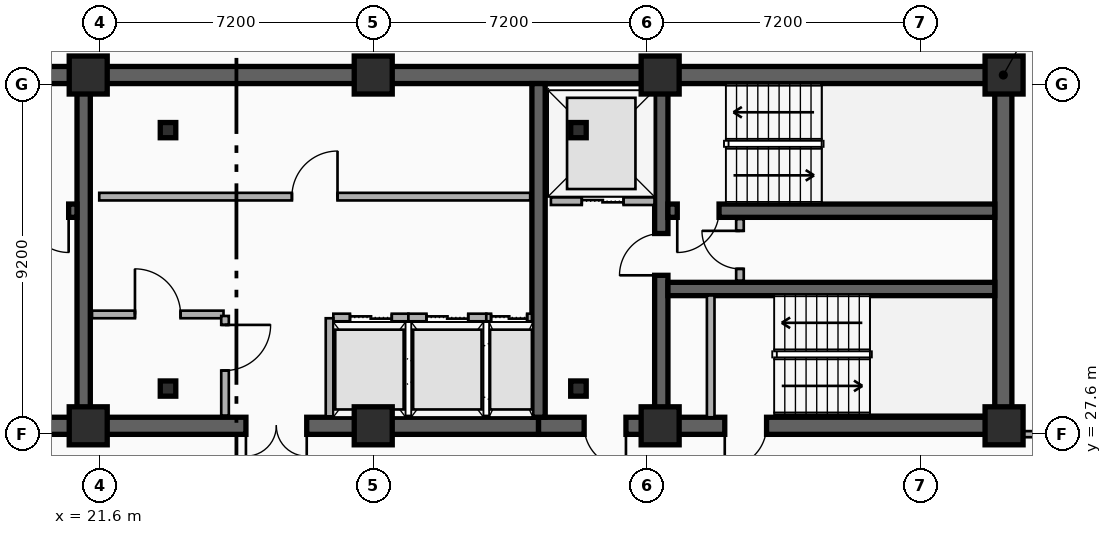
"""IFC4 building model, lengths in metres.
Left out: names, types, materials, properties, quantities, classifications, styles, units other than length and angle.
Written with IfcOpenShell. Run it as: python <this file> out.ifc"""

import sys

from ifc_helpers import new_model, si_unit, direction, frame, frame_2d, origin, origin_2d, place, context, subcontext, project, spatial, rectangle, i_section, extrude, element, fill, save


model = new_model("IFC4")
c1 = context("Model", 3, precision=1e-05, world=origin(), true_north=direction((0.0, 1.0)))
c2 = subcontext(c1, "Body", "Model", "MODEL_VIEW")
j1 = project(units=[si_unit("LENGTHUNIT", "METRE"), si_unit("PLANEANGLEUNIT", "RADIAN")], contexts=[c1])
p1 = place(None, origin())
s1 = spatial("IfcSite", under=j1, at=p1, CompositionType="ELEMENT")
p2 = place(p1, origin())
s2 = spatial("IfcBuilding", under=s1, at=p2, CompositionType="ELEMENT")
p3 = place(p2, frame((0.0, 0.0, 214.8)))
s3 = spatial("IfcBuildingStorey", under=s2, at=p3, CompositionType="ELEMENT", Elevation=214.8)
p4 = place(p3, frame((12.15, 37.05, 0.0), z_axis=(0.0, 0.0, 1.0), x_axis=(1.0, 0.0, 0.0)))
e1 = element("IfcWall", 1, at=p4, inside=s3, PredefinedType="SHEAR", context=c2, shape_type="SweptSolid", body=[
    extrude(rectangle(XDim=33.23, YDim=0.45, at=frame_2d((16.615, 0.0))), origin(), (0.0, 0.0, 1.0), 3.6),
])
p5 = place(p3, frame((21.18, 27.82, 0.0), z_axis=(0.0, 0.0, 1.0), x_axis=(-1.0, 0.0, 0.0)))
e2 = element("IfcWall", 2, at=p5, inside=s3, PredefinedType="SHEAR", context=c2, shape_type="SweptSolid", body=[
    extrude(rectangle(XDim=9.03, YDim=0.45, at=frame_2d((4.515, 0.0))), origin(), (0.0, 0.0, 1.0), 3.6),
])
p6 = place(p5, frame((2.68, 0.0, 0.0)))
e3 = element("IfcOpeningElement", 3, at=p6, cuts=e2, PredefinedType="OPENING", context=c2, shape_type="SweptSolid", body=[
    extrude(rectangle(XDim=1.1, YDim=2.15, at=frame_2d((0.55, 1.075))), frame((0.0, 0.235, 0.0), z_axis=(0.0, -1.0, 0.0), x_axis=(1.0, 0.0, 0.0)), (0.0, 0.0, 1.0), 0.47),
])
p7 = place(p3, frame((33.15, 27.82, 0.0), z_axis=(0.0, 0.0, 1.0), x_axis=(-1.0, 0.0, 0.0)))
e4 = element("IfcWall", 4, at=p7, inside=s3, PredefinedType="SHEAR", context=c2, shape_type="SweptSolid", body=[
    extrude(rectangle(XDim=11.97, YDim=0.45, at=frame_2d((5.985, 0.0))), origin(), (0.0, 0.0, 1.0), 3.6),
])
p8 = place(p7, frame((6.1, 0.0, 0.0)))
e5 = element("IfcOpeningElement", 5, at=p8, cuts=e4, PredefinedType="OPENING", context=c2, shape_type="SweptSolid", body=[
    extrude(rectangle(XDim=1.6, YDim=2.2, at=frame_2d((0.8, 1.1))), frame((0.0, 0.235, 0.0), z_axis=(0.0, -1.0, 0.0), x_axis=(1.0, 0.0, 0.0)), (0.0, 0.0, 1.0), 0.47),
])
p9 = place(p3, frame((45.38, 27.82, 0.0), z_axis=(0.0, 0.0, 1.0), x_axis=(-1.0, 0.0, 0.0)))
e6 = element("IfcWall", 6, at=p9, inside=s3, PredefinedType="SHEAR", context=c2, shape_type="SweptSolid", body=[
    extrude(rectangle(XDim=12.23, YDim=0.45, at=frame_2d((6.115, 0.0))), origin(), (0.0, 0.0, 1.0), 3.6),
])
p10 = place(p9, frame((9.93, 0.0, 0.0)))
e7 = element("IfcOpeningElement", 7, at=p10, cuts=e6, PredefinedType="OPENING", context=c2, shape_type="SweptSolid", body=[
    extrude(rectangle(XDim=1.1, YDim=2.15, at=frame_2d((0.55, 1.075))), frame((0.0, 0.235, 0.0), z_axis=(0.0, -1.0, 0.0), x_axis=(1.0, 0.0, 0.0)), (0.0, 0.0, 1.0), 0.47),
])
p11 = place(p9, frame((6.23, 0.0, 0.0)))
e8 = element("IfcOpeningElement", 8, at=p11, cuts=e6, PredefinedType="OPENING", context=c2, shape_type="SweptSolid", body=[
    extrude(rectangle(XDim=1.1, YDim=2.15, at=frame_2d((0.55, 1.075))), frame((0.0, 0.235, 0.0), z_axis=(0.0, -1.0, 0.0), x_axis=(1.0, 0.0, 0.0)), (0.0, 0.0, 1.0), 0.47),
])
p12 = place(p3, frame((45.38, 28.045, 0.0), z_axis=(0.0, 0.0, 1.0), x_axis=(0.0, 1.0, 0.0)))
e9 = element("IfcWall", 9, at=p12, inside=s3, PredefinedType="SHEAR", context=c2, shape_type="SweptSolid", body=[
    extrude(rectangle(XDim=8.78, YDim=0.45, at=frame_2d((4.39, 0.0))), origin(), (0.0, 0.0, 1.0), 3.6),
])
for number, where, z_axis, x_axis in (
    (10, (21.18, 28.045, 0.0), (0.0, 0.0, 1.0), (0.0, 1.0, 0.0)),
    (11, (33.15, 28.045, 0.0), (0.0, 0.0, 1.0), (0.0, 1.0, 0.0)),
):
    element("IfcWall", number, at=place(p3, frame(where, z_axis=z_axis, x_axis=x_axis)), inside=s3, PredefinedType="SHEAR", context=c2, shape_type="SweptSolid", body=[
        extrude(rectangle(XDim=8.78, YDim=0.35, at=frame_2d((4.39, 0.0))), origin(), (0.0, 0.0, 1.0), 3.6),
    ])
p13 = place(p3, frame((36.38, 28.045, 0.0), z_axis=(0.0, 0.0, 1.0), x_axis=(0.0, 1.0, 0.0)))
e12 = element("IfcWall", 12, at=p13, inside=s3, PredefinedType="SHEAR", context=c2, shape_type="SweptSolid", body=[
    extrude(rectangle(XDim=8.78, YDim=0.35, at=frame_2d((4.39, 0.0))), origin(), (0.0, 0.0, 1.0), 3.6),
])
p14 = place(p13, frame((3.735, 0.0, 0.0)))
e13 = element("IfcOpeningElement", 13, at=p14, cuts=e12, PredefinedType="OPENING", context=c2, shape_type="SweptSolid", body=[
    extrude(rectangle(XDim=1.1, YDim=2.15, at=frame_2d((0.55, 1.075))), frame((0.0, 0.185, 0.0), z_axis=(0.0, -1.0, 0.0), x_axis=(1.0, 0.0, 0.0)), (0.0, 0.0, 1.0), 0.37),
])
p15 = place(p3, frame((21.005, 33.48, 0.0), z_axis=(0.0, 0.0, 1.0), x_axis=(-1.0, 0.0, 0.0)))
e14 = element("IfcWall", 14, at=p15, inside=s3, PredefinedType="SHEAR", context=c2, shape_type="SweptSolid", body=[
    extrude(rectangle(XDim=8.63, YDim=0.35, at=frame_2d((4.315, 0.0))), origin(), (0.0, 0.0, 1.0), 3.6),
])
p16 = place(p15, frame((0.22, 0.0, 0.0)))
e15 = element("IfcOpeningElement", 15, at=p16, cuts=e14, PredefinedType="OPENING", context=c2, shape_type="SweptSolid", body=[
    extrude(rectangle(XDim=1.1, YDim=2.15, at=frame_2d((0.55, 1.075))), frame((0.0, 0.185, 0.0), z_axis=(0.0, -1.0, 0.0), x_axis=(1.0, 0.0, 0.0)), (0.0, 0.0, 1.0), 0.37),
])
p17 = place(p3, frame((45.155, 33.48, 0.0), z_axis=(0.0, 0.0, 1.0), x_axis=(-1.0, 0.0, 0.0)))
e16 = element("IfcWall", 16, at=p17, inside=s3, PredefinedType="SHEAR", context=c2, shape_type="SweptSolid", body=[
    extrude(rectangle(XDim=8.6, YDim=0.35, at=frame_2d((4.3, 0.0))), origin(), (0.0, 0.0, 1.0), 3.6),
])
p18 = place(p17, frame((7.255, 0.0, 0.0)))
e17 = element("IfcOpeningElement", 17, at=p18, cuts=e16, PredefinedType="OPENING", context=c2, shape_type="SweptSolid", body=[
    extrude(rectangle(XDim=1.1, YDim=2.15, at=frame_2d((0.55, 1.075))), frame((0.0, 0.185, 0.0), z_axis=(0.0, -1.0, 0.0), x_axis=(1.0, 0.0, 0.0)), (0.0, 0.0, 1.0), 0.37),
])
p19 = place(p3, frame((36.555, 31.42, 0.0), z_axis=(0.0, 0.0, 1.0), x_axis=(1.0, 0.0, 0.0)))
e18 = element("IfcWall", 18, at=p19, inside=s3, PredefinedType="SHEAR", context=c2, shape_type="SweptSolid", body=[
    extrude(rectangle(XDim=8.6, YDim=0.35, at=frame_2d((4.3, 0.0))), origin(), (0.0, 0.0, 1.0), 3.6),
])
for number, where, z_axis, x_axis in (
    (19, (23.4, 28.8, 0.0), (0.0, 0.0, 1.0), (1.0, 0.0, 0.0)),
    (20, (34.2, 28.8, 0.0), (0.0, 0.0, 1.0), (1.0, 0.0, 0.0)),
    (21, (34.2, 35.6, 0.0), (0.0, 0.0, 1.0), (1.0, 0.0, 0.0)),
    (22, (23.4, 35.6, 0.0), (0.0, 0.0, 1.0), (1.0, 0.0, 0.0)),
):
    element("IfcColumn", number, at=place(p3, frame(where, z_axis=z_axis, x_axis=x_axis)), inside=s3, PredefinedType="COLUMN", context=c2, shape_type="SweptSolid", body=[
        extrude(i_section(OverallWidth=0.408, OverallDepth=0.4, WebThickness=0.025, FlangeThickness=0.039, FilletRadius=0.015, at=origin_2d()), origin(), (0.0, 0.0, 1.0), 3.6),
    ])
for number, where, z_axis, x_axis in (
    (23, (21.3, 27.82, 0.0), (0.0, 0.0, 1.0), (1.0, 0.0, 0.0)),
    (24, (21.3, 37.05, 0.0), (0.0, 0.0, 1.0), (1.0, 0.0, 0.0)),
    (25, (28.8, 27.82, 0.0), (0.0, 0.0, 1.0), (1.0, 0.0, 0.0)),
    (26, (28.8, 37.05, 0.0), (0.0, 0.0, 1.0), (1.0, 0.0, 0.0)),
    (27, (36.35, 27.82, 0.0), (0.0, 0.0, 1.0), (1.0, 0.0, 0.0)),
    (28, (36.35, 37.05, 0.0), (0.0, 0.0, 1.0), (1.0, 0.0, 0.0)),
    (29, (45.4, 27.82, 0.0), (0.0, 0.0, 1.0), (1.0, 0.0, 0.0)),
    (30, (45.4, 37.05, 0.0), (0.0, 0.0, 1.0), (1.0, 0.0, 0.0)),
):
    element("IfcColumn", number, at=place(p3, frame(where, z_axis=z_axis, x_axis=x_axis)), inside=s3, PredefinedType="COLUMN", context=c2, shape_type="SweptSolid", body=[
        extrude(rectangle(XDim=1.0, YDim=1.0, at=origin_2d()), origin(), (0.0, 0.0, 1.0), 3.6),
    ])
p20 = place(p3, frame((33.475, 33.73, 0.0), z_axis=(0.0, 0.0, 1.0), x_axis=(1.0, 0.0, 0.0)))
e31 = element("IfcWall", 31, at=p20, inside=s3, PredefinedType="PARTITIONING", context=c2, shape_type="SweptSolid", body=[
    extrude(rectangle(XDim=2.725, YDim=0.2, at=frame_2d((1.362, 0.0))), origin(), (0.0, 0.0, 1.0), 2.41),
])
p21 = place(p20, frame((0.812, 0.0, 0.0)))
e32 = element("IfcOpeningElement", 32, at=p21, cuts=e31, PredefinedType="OPENING", context=c2, shape_type="SweptSolid", body=[
    extrude(rectangle(XDim=1.1, YDim=2.15, at=frame_2d((0.55, 1.075))), frame((0.0, 0.11, 0.0), z_axis=(0.0, -1.0, 0.0), x_axis=(1.0, 0.0, 0.0)), (0.0, 0.0, 1.0), 0.22),
])
p22 = place(p3, frame((27.75, 30.67, 0.0), z_axis=(0.0, 0.0, 1.0), x_axis=(1.0, 0.0, 0.0)))
e33 = element("IfcWall", 33, at=p22, inside=s3, PredefinedType="PARTITIONING", context=c2, shape_type="SweptSolid", body=[
    extrude(rectangle(XDim=1.975, YDim=0.2, at=frame_2d((0.988, 0.0))), origin(), (0.0, 0.0, 1.0), 2.41),
])
p23 = place(p22, frame((0.438, 0.0, 0.0)))
e34 = element("IfcOpeningElement", 34, at=p23, cuts=e33, PredefinedType="OPENING", context=c2, shape_type="SweptSolid", body=[
    extrude(rectangle(XDim=1.1, YDim=2.15, at=frame_2d((0.55, 1.075))), frame((0.0, 0.11, 0.0), z_axis=(0.0, -1.0, 0.0), x_axis=(1.0, 0.0, 0.0)), (0.0, 0.0, 1.0), 0.22),
])
p24 = place(p3, frame((27.65, 28.07, 0.0), z_axis=(0.0, 0.0, 1.0), x_axis=(0.0, 1.0, 0.0)))
e35 = element("IfcWall", 35, at=p24, inside=s3, PredefinedType="PARTITIONING", context=c2, shape_type="SweptSolid", body=[
    extrude(rectangle(XDim=2.58, YDim=0.2, at=frame_2d((1.29, 0.0))), origin(), (0.0, 0.0, 1.0), 2.41),
])
p25 = place(p3, frame((29.725, 30.67, 0.0), z_axis=(0.0, 0.0, 1.0), x_axis=(1.0, 0.0, 0.0)))
e36 = element("IfcWall", 36, at=p25, inside=s3, PredefinedType="PARTITIONING", context=c2, shape_type="SweptSolid", body=[
    extrude(rectangle(XDim=2.05, YDim=0.2, at=frame_2d((1.025, 0.0))), origin(), (0.0, 0.0, 1.0), 2.72),
])
p26 = place(p25, frame((0.475, 0.0, 0.0)))
e37 = element("IfcOpeningElement", 37, at=p26, cuts=e36, PredefinedType="OPENING", context=c2, shape_type="SweptSolid", body=[
    extrude(rectangle(XDim=1.1, YDim=2.15, at=frame_2d((0.55, 1.075))), frame((0.0, 0.11, 0.0), z_axis=(0.0, -1.0, 0.0), x_axis=(1.0, 0.0, 0.0)), (0.0, 0.0, 1.0), 0.22),
])
p27 = place(p3, frame((31.775, 30.67, 0.0), z_axis=(0.0, 0.0, 1.0), x_axis=(1.0, 0.0, 0.0)))
e38 = element("IfcWall", 38, at=p27, inside=s3, PredefinedType="PARTITIONING", context=c2, shape_type="SweptSolid", body=[
    extrude(rectangle(XDim=1.2, YDim=0.2, at=frame_2d((0.6, 0.0))), origin(), (0.0, 0.0, 1.0), 2.72),
])
p28 = place(p27, frame((0.125, 0.0, 0.0)))
e39 = element("IfcOpeningElement", 39, at=p28, cuts=e38, PredefinedType="OPENING", context=c2, shape_type="SweptSolid", body=[
    extrude(rectangle(XDim=0.95, YDim=2.15, at=frame_2d((0.475, 1.075))), frame((0.0, 0.11, 0.0), z_axis=(0.0, -1.0, 0.0), x_axis=(1.0, 0.0, 0.0)), (0.0, 0.0, 1.0), 0.22),
])
p29 = place(p3, frame((37.68, 28.045, 0.0), z_axis=(0.0, 0.0, 1.0), x_axis=(0.0, 1.0, 0.0)))
e40 = element("IfcWall", 40, at=p29, inside=s3, PredefinedType="PARTITIONING", context=c2, shape_type="SweptSolid", body=[
    extrude(rectangle(XDim=3.205, YDim=0.2, at=frame_2d((1.603, 0.0))), origin(), (0.0, 0.0, 1.0), 2.72),
])
p30 = place(p3, frame((38.45, 31.64, 0.0), z_axis=(0.0, 0.0, 1.0), x_axis=(0.0, 1.0, 0.0)))
e41 = element("IfcWall", 41, at=p30, inside=s3, PredefinedType="PARTITIONING", context=c2, shape_type="SweptSolid", body=[
    extrude(rectangle(XDim=1.62, YDim=0.2, at=frame_2d((0.81, 0.0))), origin(), (0.0, 0.0, 1.0), 3.34),
])
p31 = place(p30, frame((0.31, 0.0, 0.0)))
e42 = element("IfcOpeningElement", 42, at=p31, cuts=e41, PredefinedType="OPENING", context=c2, shape_type="SweptSolid", body=[
    extrude(rectangle(XDim=1.0, YDim=2.15, at=frame_2d((0.5, 1.075))), frame((0.0, 0.11, 0.0), z_axis=(0.0, -1.0, 0.0), x_axis=(1.0, 0.0, 0.0)), (0.0, 0.0, 1.0), 0.22),
])
p32 = place(p3, frame((21.4, 30.75, 0.0), z_axis=(0.0, 0.0, 1.0), x_axis=(1.0, 0.0, 0.0)))
e43 = element("IfcWall", 43, at=p32, inside=s3, PredefinedType="PARTITIONING", context=c2, shape_type="SweptSolid", body=[
    extrude(rectangle(XDim=3.46, YDim=0.2, at=frame_2d((1.73, 0.0))), origin(), (0.0, 0.0, 1.0), 2.41),
])
p33 = place(p32, frame((1.13, 0.0, 0.0)))
e44 = element("IfcOpeningElement", 44, at=p33, cuts=e43, PredefinedType="OPENING", context=c2, shape_type="SweptSolid", body=[
    extrude(rectangle(XDim=1.2, YDim=2.15, at=frame_2d((0.6, 1.075))), frame((0.0, 0.11, 0.0), z_axis=(0.0, -1.0, 0.0), x_axis=(1.0, 0.0, 0.0)), (0.0, 0.0, 1.0), 0.22),
])
p34 = place(p3, frame((21.59, 33.85, 0.0), z_axis=(0.0, 0.0, 1.0), x_axis=(1.0, 0.0, 0.0)))
e45 = element("IfcWall", 45, at=p34, inside=s3, PredefinedType="PARTITIONING", context=c2, shape_type="SweptSolid", body=[
    extrude(rectangle(XDim=11.34, YDim=0.2, at=frame_2d((5.67, 0.0))), origin(), (0.0, 0.0, 1.0), 2.41),
])
p35 = place(p34, frame((5.07, 0.0, 0.0)))
e46 = element("IfcOpeningElement", 46, at=p35, cuts=e45, PredefinedType="OPENING", context=c2, shape_type="SweptSolid", body=[
    extrude(rectangle(XDim=1.2, YDim=2.15, at=frame_2d((0.6, 1.075))), frame((0.0, 0.11, 0.0), z_axis=(0.0, -1.0, 0.0), x_axis=(1.0, 0.0, 0.0)), (0.0, 0.0, 1.0), 0.22),
])
p36 = place(p3, frame((24.9, 30.71, 0.0), z_axis=(0.0, 0.0, 1.0), x_axis=(0.0, -1.0, 0.0)))
e47 = element("IfcWall", 47, at=p36, inside=s3, PredefinedType="PARTITIONING", context=c2, shape_type="SweptSolid", body=[
    extrude(rectangle(XDim=2.62, YDim=0.2, at=frame_2d((1.31, 0.0))), origin(), (0.0, 0.0, 1.0), 2.72),
])
p37 = place(p36, frame((0.235, 0.0, 0.0)))
e48 = element("IfcOpeningElement", 48, at=p37, cuts=e47, PredefinedType="OPENING", context=c2, shape_type="SweptSolid", body=[
    extrude(rectangle(XDim=1.2, YDim=2.15, at=frame_2d((0.6, 1.075))), frame((0.0, 0.11, 0.0), z_axis=(0.0, -1.0, 0.0), x_axis=(1.0, 0.0, 0.0)), (0.0, 0.0, 1.0), 0.22),
])
p38 = place(p3, frame((45.41, 27.6, 0.0), z_axis=(0.0, 0.0, 1.0), x_axis=(1.0, 0.0, 0.0)))
e49 = element("IfcWall", 49, at=p38, inside=s3, PredefinedType="PARTITIONING", context=c2, shape_type="SweptSolid", body=[
    extrude(rectangle(XDim=0.91, YDim=0.16, at=frame_2d((0.455, 0.0))), origin(), (0.0, 0.0, 1.0), 2.41),
])
p39 = place(p21, origin())
e50 = element("IfcDoor", 50, at=p39, inside=s3, OperationType="DOUBLE_DOOR_SLIDING", PredefinedType="DOOR", context=c2, shape_type="SweptSolid", body=[
    extrude(rectangle(XDim=1.1, YDim=2.15, at=frame_2d((0.55, 1.075))), frame((0.0, 0.025, 0.0), z_axis=(0.0, -1.0, 0.0), x_axis=(1.0, 0.0, 0.0)), (0.0, 0.0, 1.0), 0.05),
])
fill(e32, e50)
p40 = place(p23, origin())
e51 = element("IfcDoor", 51, at=p40, inside=s3, OperationType="DOUBLE_DOOR_SLIDING", PredefinedType="DOOR", context=c2, shape_type="SweptSolid", body=[
    extrude(rectangle(XDim=1.1, YDim=2.15, at=frame_2d((0.55, 1.075))), frame((0.0, 0.025, 0.0), z_axis=(0.0, -1.0, 0.0), x_axis=(1.0, 0.0, 0.0)), (0.0, 0.0, 1.0), 0.05),
])
fill(e34, e51)
p41 = place(p26, origin())
e52 = element("IfcDoor", 52, at=p41, inside=s3, OperationType="DOUBLE_DOOR_SLIDING", PredefinedType="DOOR", context=c2, shape_type="SweptSolid", body=[
    extrude(rectangle(XDim=1.1, YDim=2.15, at=frame_2d((0.55, 1.075))), frame((0.0, 0.025, 0.0), z_axis=(0.0, -1.0, 0.0), x_axis=(1.0, 0.0, 0.0)), (0.0, 0.0, 1.0), 0.05),
])
fill(e37, e52)
p42 = place(p28, origin())
e53 = element("IfcDoor", 53, at=p42, inside=s3, OperationType="DOUBLE_DOOR_SLIDING", PredefinedType="DOOR", context=c2, shape_type="SweptSolid", body=[
    extrude(rectangle(XDim=0.95, YDim=2.15, at=frame_2d((0.475, 1.075))), frame((0.0, 0.025, 0.0), z_axis=(0.0, -1.0, 0.0), x_axis=(1.0, 0.0, 0.0)), (0.0, 0.0, 1.0), 0.05),
])
fill(e39, e53)
p43 = place(p16, origin())
e54 = element("IfcDoor", 54, at=p43, inside=s3, OperationType="SINGLE_SWING_LEFT", PredefinedType="DOOR", context=c2, shape_type="SweptSolid", body=[
    extrude(rectangle(XDim=1.1, YDim=2.15, at=frame_2d((0.55, 1.075))), frame((0.0, 0.025, 0.0), z_axis=(0.0, -1.0, 0.0), x_axis=(1.0, 0.0, 0.0)), (0.0, 0.0, 1.0), 0.05),
])
fill(e15, e54)
p44 = place(p18, origin())
e55 = element("IfcDoor", 55, at=p44, inside=s3, OperationType="SINGLE_SWING_RIGHT", PredefinedType="DOOR", context=c2, shape_type="SweptSolid", body=[
    extrude(rectangle(XDim=1.1, YDim=2.15, at=frame_2d((0.55, 1.075))), frame((0.0, 0.025, 0.0), z_axis=(0.0, -1.0, 0.0), x_axis=(1.0, 0.0, 0.0)), (0.0, 0.0, 1.0), 0.05),
])
fill(e17, e55)
p45 = place(p14, origin())
e56 = element("IfcDoor", 56, at=p45, inside=s3, OperationType="SINGLE_SWING_LEFT", PredefinedType="DOOR", context=c2, shape_type="SweptSolid", body=[
    extrude(rectangle(XDim=1.1, YDim=2.15, at=frame_2d((0.55, 1.075))), frame((0.0, 0.025, 0.0), z_axis=(0.0, -1.0, 0.0), x_axis=(1.0, 0.0, 0.0)), (0.0, 0.0, 1.0), 0.05),
])
fill(e13, e56)
p46 = place(p10, origin())
e57 = element("IfcDoor", 57, at=p46, inside=s3, OperationType="SINGLE_SWING_LEFT", PredefinedType="DOOR", context=c2, shape_type="SweptSolid", body=[
    extrude(rectangle(XDim=1.1, YDim=2.15, at=frame_2d((0.55, 1.075))), frame((0.0, 0.025, 0.0), z_axis=(0.0, -1.0, 0.0), x_axis=(1.0, 0.0, 0.0)), (0.0, 0.0, 1.0), 0.05),
])
fill(e7, e57)
p47 = place(p11, origin())
e58 = element("IfcDoor", 58, at=p47, inside=s3, OperationType="SINGLE_SWING_RIGHT", PredefinedType="DOOR", context=c2, shape_type="SweptSolid", body=[
    extrude(rectangle(XDim=1.1, YDim=2.15, at=frame_2d((0.55, 1.075))), frame((0.0, 0.025, 0.0), z_axis=(0.0, -1.0, 0.0), x_axis=(1.0, 0.0, 0.0)), (0.0, 0.0, 1.0), 0.05),
])
fill(e8, e58)
p48 = place(p8, origin())
e59 = element("IfcDoor", 59, at=p48, inside=s3, OperationType="SINGLE_SWING_LEFT", PredefinedType="DOOR", context=c2, shape_type="SweptSolid", body=[
    extrude(rectangle(XDim=1.6, YDim=2.2, at=frame_2d((0.8, 1.1))), frame((0.0, 0.025, 0.0), z_axis=(0.0, -1.0, 0.0), x_axis=(1.0, 0.0, 0.0)), (0.0, 0.0, 1.0), 0.05),
])
fill(e5, e59)
p49 = place(p31, origin())
e60 = element("IfcDoor", 60, at=p49, inside=s3, OperationType="SINGLE_SWING_RIGHT", PredefinedType="DOOR", context=c2, shape_type="SweptSolid", body=[
    extrude(rectangle(XDim=1.0, YDim=2.15, at=frame_2d((0.5, 1.075))), frame((0.0, 0.025, 0.0), z_axis=(0.0, -1.0, 0.0), x_axis=(1.0, 0.0, 0.0)), (0.0, 0.0, 1.0), 0.05),
])
fill(e42, e60)
p50 = place(p33, origin())
e61 = element("IfcDoor", 61, at=p50, inside=s3, OperationType="SINGLE_SWING_LEFT", PredefinedType="DOOR", context=c2, shape_type="SweptSolid", body=[
    extrude(rectangle(XDim=1.2, YDim=2.15, at=frame_2d((0.6, 1.075))), frame((0.0, 0.025, 0.0), z_axis=(0.0, -1.0, 0.0), x_axis=(1.0, 0.0, 0.0)), (0.0, 0.0, 1.0), 0.05),
])
fill(e44, e61)
p51 = place(p35, origin())
e62 = element("IfcDoor", 62, at=p51, inside=s3, OperationType="SINGLE_SWING_RIGHT", PredefinedType="DOOR", context=c2, shape_type="SweptSolid", body=[
    extrude(rectangle(XDim=1.2, YDim=2.15, at=frame_2d((0.6, 1.075))), frame((0.0, 0.025, 0.0), z_axis=(0.0, -1.0, 0.0), x_axis=(1.0, 0.0, 0.0)), (0.0, 0.0, 1.0), 0.05),
])
fill(e46, e62)
p52 = place(p37, origin())
e63 = element("IfcDoor", 63, at=p52, inside=s3, OperationType="SINGLE_SWING_LEFT", PredefinedType="DOOR", context=c2, shape_type="SweptSolid", body=[
    extrude(rectangle(XDim=1.2, YDim=2.15, at=frame_2d((0.6, 1.075))), frame((0.0, 0.025, 0.0), z_axis=(0.0, -1.0, 0.0), x_axis=(1.0, 0.0, 0.0)), (0.0, 0.0, 1.0), 0.05),
])
fill(e48, e63)
save(model, sys.argv[1])
